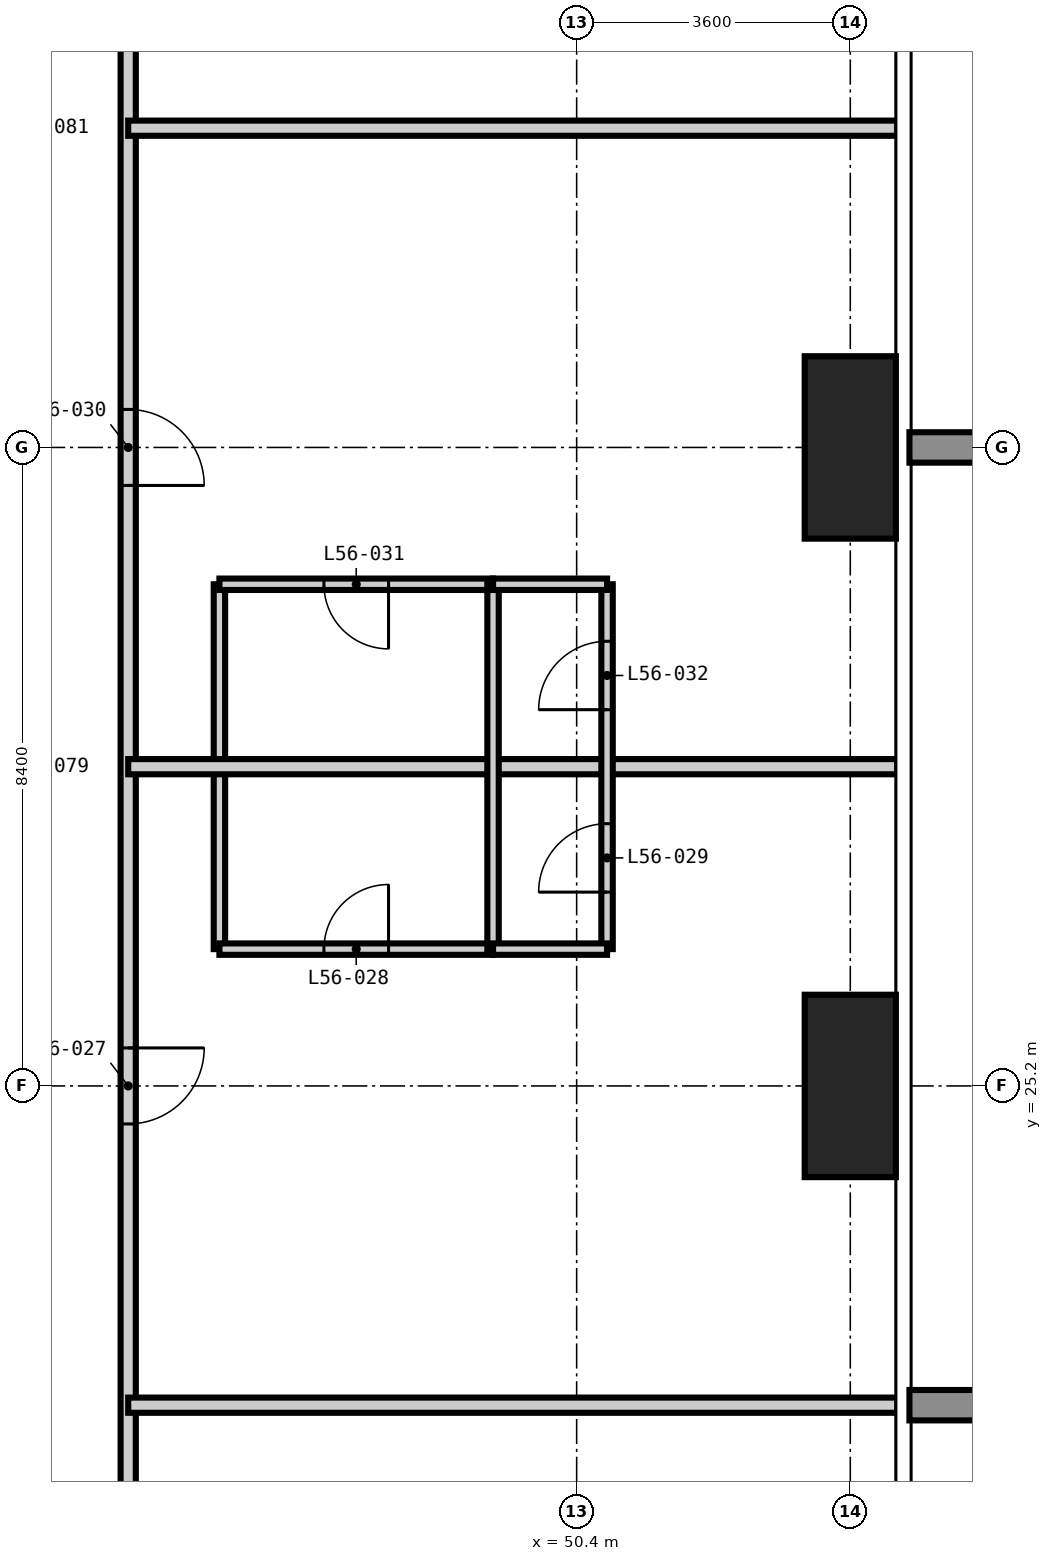
"""IFC4 building model, lengths in metres.
Left out: names, types, materials, properties, quantities, classifications, styles, units other than length and angle.
Written with IfcOpenShell. Run it as: python <this file> out.ifc"""

import sys

from ifc_helpers import new_model, si_unit, direction, frame, frame_2d, origin, origin_2d, place, context, subcontext, project, spatial, rectangle, extrude, element, fill, save


model = new_model("IFC4")
c1 = context("Model", 3, precision=1e-05, world=origin(), true_north=direction((0.0, 1.0)))
c2 = subcontext(c1, "Body", "Model", "MODEL_VIEW")
j1 = project(units=[si_unit("LENGTHUNIT", "METRE"), si_unit("PLANEANGLEUNIT", "RADIAN")], contexts=[c1])
p1 = place(None, origin())
s1 = spatial("IfcSite", under=j1, at=p1, CompositionType="ELEMENT")
p2 = place(p1, origin())
s2 = spatial("IfcBuilding", under=s1, at=p2, CompositionType="ELEMENT")
p3 = place(p2, frame((0.0, 0.0, 216.6)))
s3 = spatial("IfcBuildingStorey", under=s2, at=p3, CompositionType="ELEMENT", Elevation=216.6)
for number, where, z_axis, x_axis in (
    (1, (54.0, 25.2, -0.35), (0.0, 0.0, 1.0), (1.0, 0.0, 0.0)),
    (2, (54.0, 33.6, -0.35), (0.0, 0.0, 1.0), (1.0, 0.0, 0.0)),
):
    element("IfcColumn", number, at=place(p3, frame(where, z_axis=z_axis, x_axis=x_axis)), inside=s3, PredefinedType="COLUMN", context=c2, shape_type="SweptSolid", body=[
        extrude(rectangle(XDim=1.2, YDim=2.4, at=origin_2d()), origin(), (0.0, 0.0, 1.0), 3.55),
    ])
p4 = place(p3, frame((45.7, 27.0, 0.0), z_axis=(0.0, 0.0, 1.0), x_axis=(0.0, 1.0, 0.0)))
e3 = element("IfcWall", 3, at=p4, inside=s3, PredefinedType="PARTITIONING", context=c2, shape_type="SweptSolid", body=[
    extrude(rectangle(XDim=4.8, YDim=0.15, at=frame_2d((2.4, 0.0))), origin(), (0.0, 0.0, 1.0), 3.2),
])
p5 = place(p3, frame((45.7, 27.0, 0.0), z_axis=(0.0, 0.0, 1.0), x_axis=(1.0, 0.0, 0.0)))
e4 = element("IfcWall", 4, at=p5, inside=s3, PredefinedType="PARTITIONING", context=c2, shape_type="SweptSolid", body=[
    extrude(rectangle(XDim=3.6, YDim=0.15, at=frame_2d((1.8, 0.0))), origin(), (0.0, 0.0, 1.0), 3.2),
])
p6 = place(p5, frame((1.375, 0.0, 0.0)))
e5 = element("IfcOpeningElement", 5, at=p6, cuts=e4, PredefinedType="OPENING", context=c2, shape_type="SweptSolid", body=[
    extrude(rectangle(XDim=0.85, YDim=2.1, at=frame_2d((0.425, 1.05))), frame((0.0, 0.085, 0.0), z_axis=(0.0, -1.0, 0.0), x_axis=(1.0, 0.0, 0.0)), (0.0, 0.0, 1.0), 0.17),
])
p7 = place(p3, frame((45.7, 31.8, 0.0), z_axis=(0.0, 0.0, 1.0), x_axis=(1.0, 0.0, 0.0)))
e6 = element("IfcWall", 6, at=p7, inside=s3, PredefinedType="PARTITIONING", context=c2, shape_type="SweptSolid", body=[
    extrude(rectangle(XDim=3.6, YDim=0.15, at=frame_2d((1.8, 0.0))), origin(), (0.0, 0.0, 1.0), 3.2),
])
p8 = place(p7, frame((1.375, 0.0, 0.0)))
e7 = element("IfcOpeningElement", 7, at=p8, cuts=e6, PredefinedType="OPENING", context=c2, shape_type="SweptSolid", body=[
    extrude(rectangle(XDim=0.85, YDim=2.1, at=frame_2d((0.425, 1.05))), frame((0.0, 0.085, 0.0), z_axis=(0.0, -1.0, 0.0), x_axis=(1.0, 0.0, 0.0)), (0.0, 0.0, 1.0), 0.17),
])
p9 = place(p3, frame((44.5, 45.1, 0.0), z_axis=(0.0, 0.0, 1.0), x_axis=(0.0, -1.0, 0.0)))
e8 = element("IfcWall", 8, at=p9, inside=s3, PredefinedType="PARTITIONING", context=c2, shape_type="SweptSolid", body=[
    extrude(rectangle(XDim=32.0, YDim=0.2, at=frame_2d((16.0, 0.0))), origin(), (0.0, 0.0, 1.0), 3.2),
])
p10 = place(p9, frame((25.7, 0.0, 0.0)))
e9 = element("IfcOpeningElement", 9, at=p10, cuts=e8, PredefinedType="OPENING", context=c2, shape_type="SweptSolid", body=[
    extrude(rectangle(XDim=1.0, YDim=2.2, at=frame_2d((0.5, 1.1))), frame((0.0, 0.11, 0.0), z_axis=(0.0, -1.0, 0.0), x_axis=(1.0, 0.0, 0.0)), (0.0, 0.0, 1.0), 0.22),
])
p11 = place(p9, frame((19.4, 0.0, 0.0)))
e10 = element("IfcOpeningElement", 10, at=p11, cuts=e8, PredefinedType="OPENING", context=c2, shape_type="SweptSolid", body=[
    extrude(rectangle(XDim=1.0, YDim=2.2, at=frame_2d((0.5, 1.1))), frame((0.0, 0.11, 0.0), z_axis=(0.0, -1.0, 0.0), x_axis=(1.0, 0.0, 0.0)), (0.0, 0.0, 1.0), 0.22),
])
p12 = place(p9, frame((11.0, 0.0, 0.0)))
e11 = element("IfcOpeningElement", 11, at=p12, cuts=e8, PredefinedType="OPENING", context=c2, shape_type="SweptSolid", body=[
    extrude(rectangle(XDim=1.0, YDim=2.2, at=frame_2d((0.5, 1.1))), frame((0.0, 0.11, 0.0), z_axis=(0.0, -1.0, 0.0), x_axis=(1.0, 0.0, 0.0)), (0.0, 0.0, 1.0), 0.22),
])
p13 = place(p9, frame((4.7, 0.0, 0.0)))
e12 = element("IfcOpeningElement", 12, at=p13, cuts=e8, PredefinedType="OPENING", context=c2, shape_type="SweptSolid", body=[
    extrude(rectangle(XDim=1.0, YDim=2.2, at=frame_2d((0.5, 1.1))), frame((0.0, 0.11, 0.0), z_axis=(0.0, -1.0, 0.0), x_axis=(1.0, 0.0, 0.0)), (0.0, 0.0, 1.0), 0.22),
])
p14 = place(p9, frame((29.65, 0.0, 0.0)))
e13 = element("IfcOpeningElement", 13, at=p14, cuts=e8, PredefinedType="OPENING", context=c2, shape_type="SweptSolid", body=[
    extrude(rectangle(XDim=1.0, YDim=2.2, at=frame_2d((0.5, 1.1))), frame((0.0, 0.11, 0.0), z_axis=(0.0, -1.0, 0.0), x_axis=(1.0, 0.0, 0.0)), (0.0, 0.0, 1.0), 0.22),
])
p15 = place(p9, frame((1.05, 0.0, 0.0)))
e14 = element("IfcOpeningElement", 14, at=p15, cuts=e8, PredefinedType="OPENING", context=c2, shape_type="SweptSolid", body=[
    extrude(rectangle(XDim=1.0, YDim=2.2, at=frame_2d((0.5, 1.1))), frame((0.0, 0.11, 0.0), z_axis=(0.0, -1.0, 0.0), x_axis=(1.0, 0.0, 0.0)), (0.0, 0.0, 1.0), 0.22),
])
for number, where, z_axis, x_axis in (
    (15, (44.5, 21.0, 0.0), (0.0, 0.0, 1.0), (1.0, 0.0, 0.0)),
    (16, (44.5, 29.4, 0.0), (0.0, 0.0, 1.0), (1.0, 0.0, 0.0)),
    (17, (44.5, 37.8, 0.0), (0.0, 0.0, 1.0), (1.0, 0.0, 0.0)),
):
    element("IfcWall", number, at=place(p3, frame(where, z_axis=z_axis, x_axis=x_axis)), inside=s3, PredefinedType="PARTITIONING", context=c2, shape_type="SweptSolid", body=[
        extrude(rectangle(XDim=10.118, YDim=0.2, at=frame_2d((5.059, 0.0))), origin(), (0.0, 0.0, 1.0), 3.2),
    ])
p16 = place(p3, frame((49.3, 27.0, 0.0), z_axis=(0.0, 0.0, 1.0), x_axis=(0.0, 1.0, 0.0)))
e18 = element("IfcWall", 18, at=p16, inside=s3, PredefinedType="PARTITIONING", context=c2, shape_type="SweptSolid", body=[
    extrude(rectangle(XDim=4.8, YDim=0.15, at=frame_2d((2.4, 0.0))), origin(), (0.0, 0.0, 1.0), 3.2),
])
p17 = place(p3, frame((50.8, 27.0, 0.0), z_axis=(0.0, 0.0, 1.0), x_axis=(0.0, 1.0, 0.0)))
e19 = element("IfcWall", 19, at=p17, inside=s3, PredefinedType="PARTITIONING", context=c2, shape_type="SweptSolid", body=[
    extrude(rectangle(XDim=4.8, YDim=0.15, at=frame_2d((2.4, 0.0))), origin(), (0.0, 0.0, 1.0), 3.2),
])
p18 = place(p17, frame((0.75, 0.0, 0.0)))
e20 = element("IfcOpeningElement", 20, at=p18, cuts=e19, PredefinedType="OPENING", context=c2, shape_type="SweptSolid", body=[
    extrude(rectangle(XDim=0.9, YDim=2.1, at=frame_2d((0.45, 1.05))), frame((0.0, 0.085, 0.0), z_axis=(0.0, -1.0, 0.0), x_axis=(1.0, 0.0, 0.0)), (0.0, 0.0, 1.0), 0.17),
])
p19 = place(p17, frame((3.15, 0.0, 0.0)))
e21 = element("IfcOpeningElement", 21, at=p19, cuts=e19, PredefinedType="OPENING", context=c2, shape_type="SweptSolid", body=[
    extrude(rectangle(XDim=0.9, YDim=2.1, at=frame_2d((0.45, 1.05))), frame((0.0, 0.085, 0.0), z_axis=(0.0, -1.0, 0.0), x_axis=(1.0, 0.0, 0.0)), (0.0, 0.0, 1.0), 0.17),
])
for number, where, z_axis, x_axis in (
    (22, (49.3, 27.0, 0.0), (0.0, 0.0, 1.0), (1.0, 0.0, 0.0)),
    (23, (49.3, 31.8, 0.0), (0.0, 0.0, 1.0), (1.0, 0.0, 0.0)),
):
    element("IfcWall", number, at=place(p3, frame(where, z_axis=z_axis, x_axis=x_axis)), inside=s3, PredefinedType="PARTITIONING", context=c2, shape_type="SweptSolid", body=[
        extrude(rectangle(XDim=1.5, YDim=0.15, at=frame_2d((0.75, 0.0))), origin(), (0.0, 0.0, 1.0), 3.2),
    ])
p20 = place(p11, origin())
e24 = element("IfcDoor", 24, at=p20, inside=s3, OperationType="SINGLE_SWING_LEFT", PredefinedType="DOOR", context=c2, shape_type="SweptSolid", body=[
    extrude(rectangle(XDim=1.0, YDim=2.2, at=frame_2d((0.5, 1.1))), frame((0.0, 0.025, 0.0), z_axis=(0.0, -1.0, 0.0), x_axis=(1.0, 0.0, 0.0)), (0.0, 0.0, 1.0), 0.05),
])
fill(e10, e24)
p21 = place(p6, origin())
e25 = element("IfcDoor", 25, at=p21, inside=s3, OperationType="SINGLE_SWING_RIGHT", PredefinedType="DOOR", context=c2, shape_type="SweptSolid", body=[
    extrude(rectangle(XDim=0.85, YDim=2.1, at=frame_2d((0.425, 1.05))), frame((0.0, 0.025, 0.0), z_axis=(0.0, -1.0, 0.0), x_axis=(1.0, 0.0, 0.0)), (0.0, 0.0, 1.0), 0.05),
])
fill(e5, e25)
p22 = place(p18, origin())
e26 = element("IfcDoor", 26, at=p22, inside=s3, OperationType="SINGLE_SWING_LEFT", PredefinedType="DOOR", context=c2, shape_type="SweptSolid", body=[
    extrude(rectangle(XDim=0.9, YDim=2.1, at=frame_2d((0.45, 1.05))), frame((0.0, 0.025, 0.0), z_axis=(0.0, -1.0, 0.0), x_axis=(1.0, 0.0, 0.0)), (0.0, 0.0, 1.0), 0.05),
])
fill(e20, e26)
p23 = place(p12, origin())
e27 = element("IfcDoor", 27, at=p23, inside=s3, OperationType="SINGLE_SWING_RIGHT", PredefinedType="DOOR", context=c2, shape_type="SweptSolid", body=[
    extrude(rectangle(XDim=1.0, YDim=2.2, at=frame_2d((0.5, 1.1))), frame((0.0, 0.025, 0.0), z_axis=(0.0, -1.0, 0.0), x_axis=(1.0, 0.0, 0.0)), (0.0, 0.0, 1.0), 0.05),
])
fill(e11, e27)
p24 = place(p8, frame((0.85, 0.0, 0.0), z_axis=(0.0, 0.0, 1.0), x_axis=(-1.0, 0.0, 0.0)))
e28 = element("IfcDoor", 28, at=p24, inside=s3, OperationType="SINGLE_SWING_LEFT", PredefinedType="DOOR", context=c2, shape_type="SweptSolid", body=[
    extrude(rectangle(XDim=0.85, YDim=2.1, at=frame_2d((0.425, 1.05))), frame((0.0, 0.025, 0.0), z_axis=(0.0, -1.0, 0.0), x_axis=(1.0, 0.0, 0.0)), (0.0, 0.0, 1.0), 0.05),
])
fill(e7, e28)
p25 = place(p19, origin())
e29 = element("IfcDoor", 29, at=p25, inside=s3, OperationType="SINGLE_SWING_LEFT", PredefinedType="DOOR", context=c2, shape_type="SweptSolid", body=[
    extrude(rectangle(XDim=0.9, YDim=2.1, at=frame_2d((0.45, 1.05))), frame((0.0, 0.025, 0.0), z_axis=(0.0, -1.0, 0.0), x_axis=(1.0, 0.0, 0.0)), (0.0, 0.0, 1.0), 0.05),
])
fill(e21, e29)
save(model, sys.argv[1])
